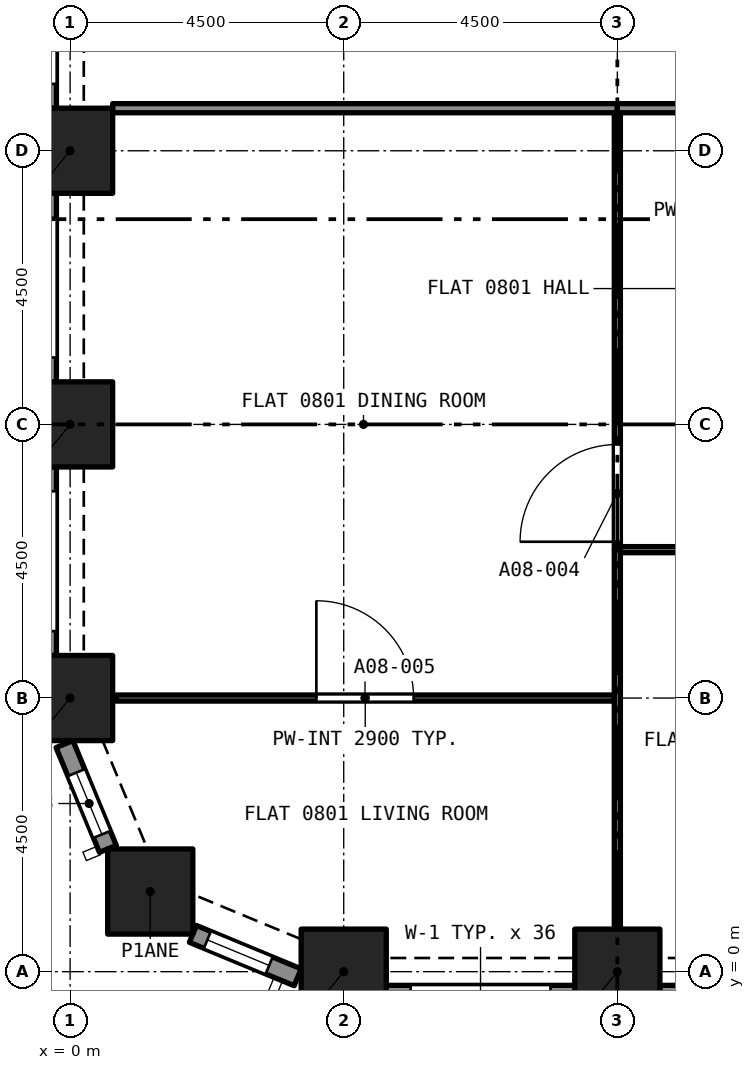
"""IFC4 building model, lengths in metres.
Left out: names, types, materials, properties, quantities, classifications, styles, units other than length and angle.
Written with IfcOpenShell. Run it as: python <this file> out.ifc"""

import sys

from ifc_helpers import new_model, si_unit, direction, frame, frame_2d, origin, origin_2d, place, context, subcontext, project, spatial, rectangle, extrude, element, fill, save


model = new_model("IFC4")
c1 = context("Model", 3, precision=1e-05, world=origin(), true_north=direction((0.0, 1.0)))
c2 = subcontext(c1, "Body", "Model", "MODEL_VIEW")
j1 = project(units=[si_unit("LENGTHUNIT", "METRE"), si_unit("PLANEANGLEUNIT", "RADIAN")], contexts=[c1])
p1 = place(None, origin())
s1 = spatial("IfcSite", under=j1, at=p1, CompositionType="ELEMENT")
p2 = place(p1, origin())
s2 = spatial("IfcBuilding", under=s1, at=p2, CompositionType="ELEMENT")
p3 = place(p2, frame((0.0, 0.0, 36.8)))
s3 = spatial("IfcBuildingStorey", under=s2, at=p3, CompositionType="ELEMENT", Elevation=36.8)
for number, where, z_axis, x_axis in (
    (1, (4.5, 0.0, 0.0), (0.0, 0.0, 1.0), (1.0, 0.0, 0.0)),
    (2, (9.0, 0.0, 0.0), (0.0, 0.0, 1.0), (1.0, 0.0, 0.0)),
    (3, (1.318, 1.318, 0.0), (0.0, 0.0, 1.0), (1.0, 0.0, 0.0)),
    (4, (0.0, 4.5, 0.0), (0.0, 0.0, 1.0), (1.0, 0.0, 0.0)),
    (5, (0.0, 9.0, 0.0), (0.0, 0.0, 1.0), (1.0, 0.0, 0.0)),
    (6, (0.0, 13.5, 0.0), (0.0, 0.0, 1.0), (1.0, 0.0, 0.0)),
):
    element("IfcColumn", number, at=place(p3, frame(where, z_axis=z_axis, x_axis=x_axis)), inside=s3, PredefinedType="COLUMN", context=c2, shape_type="SweptSolid", body=[
        extrude(rectangle(XDim=1.4, YDim=1.4, at=origin_2d()), origin(), (0.0, 0.0, 1.0), 3.2),
    ])
p4 = place(p3, frame((0.622, 2.02, 0.0), z_axis=(0.0, 0.0, 1.0), x_axis=(-0.38262540684, 0.923903565336, 0.0)))
e7 = element("IfcWall", 7, at=p4, inside=s3, PredefinedType="SOLIDWALL", context=c2, shape_type="SweptSolid", body=[
    extrude(rectangle(XDim=1.865, YDim=0.3, at=frame_2d((0.933, 0.0))), origin(), (0.0, 0.0, 1.0), 3.2),
])
p5 = place(p4, frame((0.258, 0.0, 0.45)))
e8 = element("IfcOpeningElement", 8, at=p5, cuts=e7, PredefinedType="OPENING", context=c2, shape_type="SweptSolid", body=[
    extrude(rectangle(XDim=1.1, YDim=1.95, at=frame_2d((0.55, 0.975))), frame((0.0, 0.16, 0.0), z_axis=(0.0, -1.0, 0.0), x_axis=(1.0, 0.0, 0.0)), (0.0, 0.0, 1.0), 0.32),
])
p6 = place(p3, frame((3.743, -0.092, 0.0), z_axis=(0.0, 0.0, 1.0), x_axis=(-0.923857286003, 0.382737135771, 0.0)))
e9 = element("IfcWall", 9, at=p6, inside=s3, PredefinedType="SOLIDWALL", context=c2, shape_type="SweptSolid", body=[
    extrude(rectangle(XDim=1.865, YDim=0.3, at=frame_2d((0.933, 0.0))), origin(), (0.0, 0.0, 1.0), 3.2),
])
p7 = place(p6, frame((0.508, 0.0, 0.45)))
e10 = element("IfcOpeningElement", 10, at=p7, cuts=e9, PredefinedType="OPENING", context=c2, shape_type="SweptSolid", body=[
    extrude(rectangle(XDim=1.1, YDim=1.95, at=frame_2d((0.55, 0.975))), frame((0.0, 0.16, 0.0), z_axis=(0.0, -1.0, 0.0), x_axis=(1.0, 0.0, 0.0)), (0.0, 0.0, 1.0), 0.32),
])
p8 = place(p3, frame((8.3, -0.375, 0.0), z_axis=(0.0, 0.0, 1.0), x_axis=(-1.0, 0.0, 0.0)))
e11 = element("IfcWall", 11, at=p8, inside=s3, PredefinedType="SOLIDWALL", context=c2, shape_type="SweptSolid", body=[
    extrude(rectangle(XDim=3.1, YDim=0.3, at=frame_2d((1.55, 0.0))), origin(), (0.0, 0.0, 1.0), 3.2),
])
p9 = place(p8, frame((0.4, 0.0, 0.45)))
e12 = element("IfcOpeningElement", 12, at=p9, cuts=e11, PredefinedType="OPENING", context=c2, shape_type="SweptSolid", body=[
    extrude(rectangle(XDim=2.3, YDim=1.95, at=frame_2d((1.15, 0.975))), frame((0.0, 0.16, 0.0), z_axis=(0.0, -1.0, 0.0), x_axis=(1.0, 0.0, 0.0)), (0.0, 0.0, 1.0), 0.32),
])
p10 = place(p3, frame((12.8, -0.375, 0.0), z_axis=(0.0, 0.0, 1.0), x_axis=(-1.0, 0.0, 0.0)))
e13 = element("IfcWall", 13, at=p10, inside=s3, PredefinedType="SOLIDWALL", context=c2, shape_type="SweptSolid", body=[
    extrude(rectangle(XDim=3.1, YDim=0.3, at=frame_2d((1.55, 0.0))), origin(), (0.0, 0.0, 1.0), 3.2),
])
p11 = place(p10, frame((0.4, 0.0, 0.45)))
e14 = element("IfcOpeningElement", 14, at=p11, cuts=e13, PredefinedType="OPENING", context=c2, shape_type="SweptSolid", body=[
    extrude(rectangle(XDim=2.3, YDim=1.95, at=frame_2d((1.15, 0.975))), frame((0.0, 0.16, 0.0), z_axis=(0.0, -1.0, 0.0), x_axis=(1.0, 0.0, 0.0)), (0.0, 0.0, 1.0), 0.32),
])
p12 = place(p3, frame((-0.375, 14.2, 0.0), z_axis=(0.0, 0.0, 1.0), x_axis=(0.0, 1.0, 0.0)))
e15 = element("IfcWall", 15, at=p12, inside=s3, PredefinedType="SOLIDWALL", context=c2, shape_type="SweptSolid", body=[
    extrude(rectangle(XDim=3.1, YDim=0.3, at=frame_2d((1.55, 0.0))), origin(), (0.0, 0.0, 1.0), 3.2),
])
p13 = place(p12, frame((0.4, 0.0, 0.45)))
e16 = element("IfcOpeningElement", 16, at=p13, cuts=e15, PredefinedType="OPENING", context=c2, shape_type="SweptSolid", body=[
    extrude(rectangle(XDim=2.3, YDim=1.95, at=frame_2d((1.15, 0.975))), frame((0.0, 0.16, 0.0), z_axis=(0.0, -1.0, 0.0), x_axis=(1.0, 0.0, 0.0)), (0.0, 0.0, 1.0), 0.32),
])
p14 = place(p3, frame((-0.375, 9.7, 0.0), z_axis=(0.0, 0.0, 1.0), x_axis=(0.0, 1.0, 0.0)))
e17 = element("IfcWall", 17, at=p14, inside=s3, PredefinedType="SOLIDWALL", context=c2, shape_type="SweptSolid", body=[
    extrude(rectangle(XDim=3.1, YDim=0.3, at=frame_2d((1.55, 0.0))), origin(), (0.0, 0.0, 1.0), 3.2),
])
p15 = place(p14, frame((0.4, 0.0, 0.45)))
e18 = element("IfcOpeningElement", 18, at=p15, cuts=e17, PredefinedType="OPENING", context=c2, shape_type="SweptSolid", body=[
    extrude(rectangle(XDim=2.3, YDim=1.95, at=frame_2d((1.15, 0.975))), frame((0.0, 0.16, 0.0), z_axis=(0.0, -1.0, 0.0), x_axis=(1.0, 0.0, 0.0)), (0.0, 0.0, 1.0), 0.32),
])
p16 = place(p3, frame((-0.375, 5.2, 0.0), z_axis=(0.0, 0.0, 1.0), x_axis=(0.0, 1.0, 0.0)))
e19 = element("IfcWall", 19, at=p16, inside=s3, PredefinedType="SOLIDWALL", context=c2, shape_type="SweptSolid", body=[
    extrude(rectangle(XDim=3.1, YDim=0.3, at=frame_2d((1.55, 0.0))), origin(), (0.0, 0.0, 1.0), 3.2),
])
p17 = place(p16, frame((0.4, 0.0, 0.45)))
e20 = element("IfcOpeningElement", 20, at=p17, cuts=e19, PredefinedType="OPENING", context=c2, shape_type="SweptSolid", body=[
    extrude(rectangle(XDim=2.3, YDim=1.95, at=frame_2d((1.15, 0.975))), frame((0.0, 0.16, 0.0), z_axis=(0.0, -1.0, 0.0), x_axis=(1.0, 0.0, 0.0)), (0.0, 0.0, 1.0), 0.32),
])
p18 = place(p3, frame((13.5, 6.94, 0.0), z_axis=(0.0, 0.0, 1.0), x_axis=(-1.0, 0.0, 0.0)))
e21 = element("IfcWall", 21, at=p18, inside=s3, PredefinedType="PARTITIONING", context=c2, shape_type="SweptSolid", body=[
    extrude(rectangle(XDim=4.45, YDim=0.1, at=frame_2d((2.225, 0.0))), origin(), (0.0, 0.0, 1.0), 2.9),
])
p19 = place(p18, frame((1.8, 0.0, 0.0)))
e22 = element("IfcOpeningElement", 22, at=p19, cuts=e21, PredefinedType="OPENING", context=c2, shape_type="SweptSolid", body=[
    extrude(rectangle(XDim=0.9, YDim=2.1, at=frame_2d((0.45, 1.05))), frame((0.0, 0.06, 0.0), z_axis=(0.0, -1.0, 0.0), x_axis=(1.0, 0.0, 0.0)), (0.0, 0.0, 1.0), 0.12),
])
p20 = place(p3, frame((9.0, 0.7, 0.0), z_axis=(0.0, 0.0, 1.0), x_axis=(0.0, 1.0, 0.0)))
e23 = element("IfcWall", 23, at=p20, inside=s3, PredefinedType="PARTITIONING", context=c2, shape_type="SweptSolid", body=[
    extrude(rectangle(XDim=6.24, YDim=0.1, at=frame_2d((3.12, 0.0))), origin(), (0.0, 0.0, 1.0), 2.9),
])
p21 = place(p3, frame((9.0, 6.94, 0.0), z_axis=(0.0, 0.0, 1.0), x_axis=(0.0, 1.0, 0.0)))
e24 = element("IfcWall", 24, at=p21, inside=s3, PredefinedType="PARTITIONING", context=c2, shape_type="SweptSolid", body=[
    extrude(rectangle(XDim=7.185, YDim=0.1, at=frame_2d((3.593, 0.0))), origin(), (0.0, 0.0, 1.0), 2.9),
])
p22 = place(p21, frame((0.13, 0.0, 0.0)))
e25 = element("IfcOpeningElement", 25, at=p22, cuts=e24, PredefinedType="OPENING", context=c2, shape_type="SweptSolid", body=[
    extrude(rectangle(XDim=1.6, YDim=2.1, at=frame_2d((0.8, 1.05))), frame((0.0, 0.06, 0.0), z_axis=(0.0, -1.0, 0.0), x_axis=(1.0, 0.0, 0.0)), (0.0, 0.0, 1.0), 0.12),
])
p23 = place(p3, frame((0.758, 4.5, 0.0), z_axis=(0.0, 0.0, 1.0), x_axis=(1.0, 0.0, 0.0)))
e26 = element("IfcWall", 26, at=p23, inside=s3, PredefinedType="PARTITIONING", context=c2, shape_type="SweptSolid", body=[
    extrude(rectangle(XDim=8.192, YDim=0.1, at=frame_2d((4.096, 0.0))), origin(), (0.0, 0.0, 1.0), 2.9),
])
p24 = place(p23, frame((3.292, 0.0, 0.0)))
e27 = element("IfcOpeningElement", 27, at=p24, cuts=e26, PredefinedType="OPENING", context=c2, shape_type="SweptSolid", body=[
    extrude(rectangle(XDim=1.6, YDim=2.1, at=frame_2d((0.8, 1.05))), frame((0.0, 0.06, 0.0), z_axis=(0.0, -1.0, 0.0), x_axis=(1.0, 0.0, 0.0)), (0.0, 0.0, 1.0), 0.12),
])
p25 = place(p3, frame((0.7, 14.2, 0.0), z_axis=(0.0, 0.0, 1.0), x_axis=(1.0, 0.0, 0.0)))
e28 = element("IfcWall", 28, at=p25, inside=s3, PredefinedType="PARTITIONING", context=c2, shape_type="SweptSolid", body=[
    extrude(rectangle(XDim=8.3, YDim=0.15, at=frame_2d((4.15, 0.0))), origin(), (0.0, 0.0, 1.0), 2.9),
])
p26 = place(p3, frame((11.925, 14.2, 0.0), z_axis=(0.0, 0.0, 1.0), x_axis=(-1.0, 0.0, 0.0)))
e29 = element("IfcWall", 29, at=p26, inside=s3, PredefinedType="PARTITIONING", context=c2, shape_type="SweptSolid", body=[
    extrude(rectangle(XDim=2.925, YDim=0.15, at=frame_2d((1.462, 0.0))), origin(), (0.0, 0.0, 1.0), 2.9),
])
p27 = place(p26, frame((0.175, 0.0, 0.0)))
e30 = element("IfcOpeningElement", 30, at=p27, cuts=e29, PredefinedType="OPENING", context=c2, shape_type="SweptSolid", body=[
    extrude(rectangle(XDim=1.0, YDim=2.1, at=frame_2d((0.5, 1.05))), frame((0.0, 0.085, 0.0), z_axis=(0.0, -1.0, 0.0), x_axis=(1.0, 0.0, 0.0)), (0.0, 0.0, 1.0), 0.17),
])
p28 = place(p5, origin())
e31 = element("IfcWindow", 31, at=p28, inside=s3, PartitioningType="SINGLE_PANEL", PredefinedType="WINDOW", context=c2, shape_type="SweptSolid", body=[
    extrude(rectangle(XDim=1.1, YDim=1.95, at=frame_2d((0.55, 0.975))), frame((0.0, 0.03, 0.0), z_axis=(0.0, -1.0, 0.0), x_axis=(1.0, 0.0, 0.0)), (0.0, 0.0, 1.0), 0.06),
])
fill(e8, e31)
p29 = place(p7, origin())
e32 = element("IfcWindow", 32, at=p29, inside=s3, PartitioningType="SINGLE_PANEL", PredefinedType="WINDOW", context=c2, shape_type="SweptSolid", body=[
    extrude(rectangle(XDim=1.1, YDim=1.95, at=frame_2d((0.55, 0.975))), frame((0.0, 0.03, 0.0), z_axis=(0.0, -1.0, 0.0), x_axis=(1.0, 0.0, 0.0)), (0.0, 0.0, 1.0), 0.06),
])
fill(e10, e32)
p30 = place(p22, origin())
e33 = element("IfcDoor", 33, at=p30, inside=s3, OperationType="SINGLE_SWING_LEFT", PredefinedType="DOOR", context=c2, shape_type="SweptSolid", body=[
    extrude(rectangle(XDim=1.6, YDim=2.1, at=frame_2d((0.8, 1.05))), frame((0.0, 0.025, 0.0), z_axis=(0.0, -1.0, 0.0), x_axis=(1.0, 0.0, 0.0)), (0.0, 0.0, 1.0), 0.05),
])
fill(e25, e33)
p31 = place(p24, origin())
e34 = element("IfcDoor", 34, at=p31, inside=s3, OperationType="SINGLE_SWING_LEFT", PredefinedType="DOOR", context=c2, shape_type="SweptSolid", body=[
    extrude(rectangle(XDim=1.6, YDim=2.1, at=frame_2d((0.8, 1.05))), frame((0.0, 0.025, 0.0), z_axis=(0.0, -1.0, 0.0), x_axis=(1.0, 0.0, 0.0)), (0.0, 0.0, 1.0), 0.05),
])
fill(e27, e34)
save(model, sys.argv[1])
